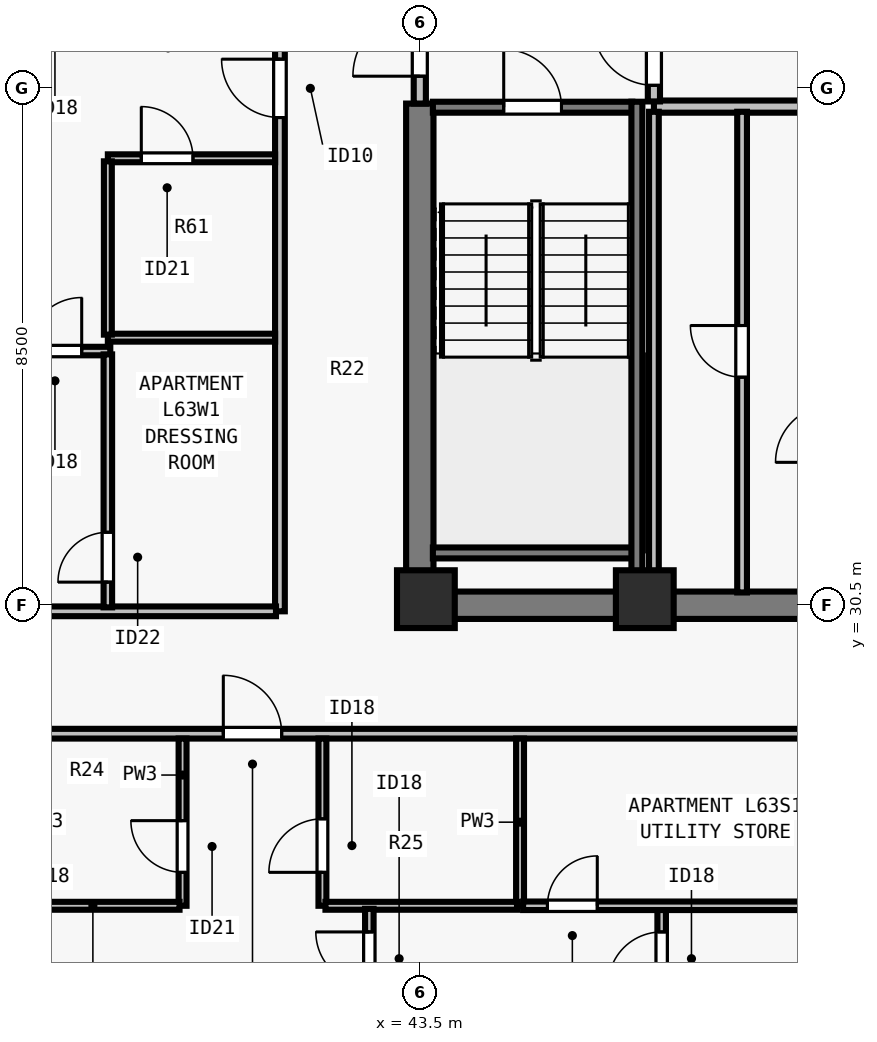
"""IFC4 building model, lengths in metres.
Left out: names, types, materials, properties, quantities, classifications, styles, units other than length and angle.
Written with IfcOpenShell. Run it as: python <this file> out.ifc"""

import sys

from ifc_helpers import new_model, si_unit, direction, frame, frame_2d, origin, origin_2d, place, context, subcontext, project, spatial, rectangle, extrude, element, fill, save


model = new_model("IFC4")
c1 = context("Model", 3, precision=1e-05, world=origin(), true_north=direction((0.0, 1.0)))
c2 = subcontext(c1, "Body", "Model", "MODEL_VIEW")
j1 = project(units=[si_unit("LENGTHUNIT", "METRE"), si_unit("PLANEANGLEUNIT", "RADIAN")], contexts=[c1])
p1 = place(None, origin())
s1 = spatial("IfcSite", under=j1, at=p1, CompositionType="ELEMENT")
p2 = place(p1, origin())
s2 = spatial("IfcBuilding", under=s1, at=p2, CompositionType="ELEMENT")
p3 = place(p2, frame((0.0, 0.0, 230.5)))
s3 = spatial("IfcBuildingStorey", under=s2, at=p3, CompositionType="ELEMENT", Elevation=230.5)
for number, where, z_axis, x_axis in (
    (1, (43.6, 30.6, 0.0), (0.0, 0.0, 1.0), (1.0, 0.0, 0.0)),
    (2, (47.2, 30.6, 0.0), (0.0, 0.0, 1.0), (1.0, 0.0, 0.0)),
):
    element("IfcColumn", number, at=place(p3, frame(where, z_axis=z_axis, x_axis=x_axis)), inside=s3, PredefinedType="COLUMN", context=c2, shape_type="SweptSolid", body=[
        extrude(rectangle(XDim=0.95, YDim=0.95, at=origin_2d()), origin(), (0.0, 0.0, 1.0), 3.5),
    ])
p4 = place(p3, frame((43.275, 30.5, 0.0), z_axis=(0.0, 0.0, 1.0), x_axis=(1.0, 0.0, 0.0)))
e3 = element("IfcWall", 3, at=p4, inside=s3, PredefinedType="SHEAR", context=c2, shape_type="SweptSolid", body=[
    extrude(rectangle(XDim=17.45, YDim=0.45, at=frame_2d((8.725, 0.0))), origin(), (0.0, 0.0, 1.0), 3.29),
])
p5 = place(p3, frame((43.5, 30.715, 0.0), z_axis=(0.0, 0.0, 1.0), x_axis=(0.0, 1.0, 0.0)))
e4 = element("IfcWall", 4, at=p5, inside=s3, PredefinedType="SHEAR", context=c2, shape_type="SweptSolid", body=[
    extrude(rectangle(XDim=8.035, YDim=0.45, at=frame_2d((4.018, 0.0))), origin(), (0.0, 0.0, 1.0), 3.29),
])
p6 = place(p3, frame((47.35, 38.7, 0.0), z_axis=(0.0, 0.0, 1.0), x_axis=(1.0, 0.0, 0.0)))
e5 = element("IfcWall", 5, at=p6, inside=s3, PredefinedType="SOLIDWALL", context=c2, shape_type="SweptSolid", body=[
    extrude(rectangle(XDim=2.95, YDim=0.2, at=frame_2d((1.475, 0.0))), origin(), (0.0, 0.0, 1.0), 3.29),
])
p7 = place(p3, frame((43.5, 38.75, 0.0), z_axis=(0.0, 0.0, 1.0), x_axis=(0.0, 1.0, 0.0)))
e6 = element("IfcWall", 6, at=p7, inside=s3, PredefinedType="SOLIDWALL", context=c2, shape_type="SweptSolid", body=[
    extrude(rectangle(XDim=2.05, YDim=0.2, at=frame_2d((1.025, 0.0))), origin(), (0.0, 0.0, 1.0), 3.29),
])
p8 = place(p7, frame((0.45, 0.0, 0.0)))
e7 = element("IfcOpeningElement", 7, at=p8, cuts=e6, PredefinedType="OPENING", context=c2, shape_type="SweptSolid", body=[
    extrude(rectangle(XDim=1.1, YDim=2.15, at=frame_2d((0.55, 1.075))), frame((0.0, 0.11, 0.0), z_axis=(0.0, -1.0, 0.0), x_axis=(1.0, 0.0, 0.0)), (0.0, 0.0, 1.0), 0.22),
])
p9 = place(p3, frame((47.35, 38.785, 0.0), z_axis=(0.0, 0.0, 1.0), x_axis=(0.0, 1.0, 0.0)))
e8 = element("IfcWall", 8, at=p9, inside=s3, PredefinedType="SOLIDWALL", context=c2, shape_type="SweptSolid", body=[
    extrude(rectangle(XDim=4.865, YDim=0.2, at=frame_2d((2.433, 0.0))), origin(), (0.0, 0.0, 1.0), 3.29),
])
p10 = place(p9, frame((0.265, 0.0, 0.0)))
e9 = element("IfcOpeningElement", 9, at=p10, cuts=e8, PredefinedType="OPENING", context=c2, shape_type="SweptSolid", body=[
    extrude(rectangle(XDim=1.0, YDim=2.15, at=frame_2d((0.5, 1.075))), frame((0.0, 0.11, 0.0), z_axis=(0.0, -1.0, 0.0), x_axis=(1.0, 0.0, 0.0)), (0.0, 0.0, 1.0), 0.22),
])
p11 = place(p3, frame((47.35, 30.71, 0.0), z_axis=(0.0, 0.0, 1.0), x_axis=(0.0, 1.0, 0.0)))
e10 = element("IfcWall", 10, at=p11, inside=s3, PredefinedType="PARTITIONING", context=c2, shape_type="SweptSolid", body=[
    extrude(rectangle(XDim=7.905, YDim=0.16, at=frame_2d((3.953, 0.0))), origin(), (0.0, 0.0, 1.0), 3.29),
])
p12 = place(p3, frame((48.8, 30.71, 0.0), z_axis=(0.0, 0.0, 1.0), x_axis=(0.0, 1.0, 0.0)))
e11 = element("IfcWall", 11, at=p12, inside=s3, PredefinedType="PARTITIONING", context=c2, shape_type="SweptSolid", body=[
    extrude(rectangle(XDim=7.905, YDim=0.16, at=frame_2d((3.953, 0.0))), origin(), (0.0, 0.0, 1.0), 3.29),
])
p13 = place(p12, frame((3.54, 0.0, 0.0)))
e12 = element("IfcOpeningElement", 12, at=p13, cuts=e11, PredefinedType="OPENING", context=c2, shape_type="SweptSolid", body=[
    extrude(rectangle(XDim=0.85, YDim=2.12, at=frame_2d((0.425, 1.06))), frame((0.0, 0.09, 0.0), z_axis=(0.0, -1.0, 0.0), x_axis=(1.0, 0.0, 0.0)), (0.0, 0.0, 1.0), 0.18),
])
p14 = place(p3, frame((29.805, 28.387, 0.0), z_axis=(0.0, 0.0, 1.0), x_axis=(1.0, 0.0, 0.0)))
e13 = element("IfcWall", 13, at=p14, inside=s3, PredefinedType="PARTITIONING", context=c2, shape_type="SweptSolid", body=[
    extrude(rectangle(XDim=44.39, YDim=0.16, at=frame_2d((22.195, 0.0))), origin(), (0.0, 0.0, 1.0), 2.958),
])
p15 = place(p14, frame((10.464, 0.0, 0.0)))
e14 = element("IfcOpeningElement", 14, at=p15, cuts=e13, PredefinedType="OPENING", context=c2, shape_type="SweptSolid", body=[
    extrude(rectangle(XDim=0.96, YDim=2.18, at=frame_2d((0.48, 1.09))), frame((0.0, 0.09, 0.0), z_axis=(0.0, -1.0, 0.0), x_axis=(1.0, 0.0, 0.0)), (0.0, 0.0, 1.0), 0.18),
])
p16 = place(p14, frame((32.544, 0.0, 0.0)))
e15 = element("IfcOpeningElement", 15, at=p16, cuts=e13, PredefinedType="OPENING", context=c2, shape_type="SweptSolid", body=[
    extrude(rectangle(XDim=0.96, YDim=2.18, at=frame_2d((0.48, 1.09))), frame((0.0, 0.09, 0.0), z_axis=(0.0, -1.0, 0.0), x_axis=(1.0, 0.0, 0.0)), (0.0, 0.0, 1.0), 0.18),
])
p17 = place(p3, frame((41.2, 30.4, 0.0), z_axis=(0.0, 0.0, 1.0), x_axis=(0.0, 1.0, 0.0)))
e16 = element("IfcWall", 16, at=p17, inside=s3, PredefinedType="PARTITIONING", context=c2, shape_type="SweptSolid", body=[
    extrude(rectangle(XDim=17.2, YDim=0.16, at=frame_2d((8.6, 0.0))), origin(), (0.0, 0.0, 1.0), 3.29),
])
p18 = place(p17, frame((8.12, 0.0, 0.0)))
e17 = element("IfcOpeningElement", 17, at=p18, cuts=e16, PredefinedType="OPENING", context=c2, shape_type="SweptSolid", body=[
    extrude(rectangle(XDim=0.96, YDim=2.18, at=frame_2d((0.48, 1.09))), frame((0.0, 0.09, 0.0), z_axis=(0.0, -1.0, 0.0), x_axis=(1.0, 0.0, 0.0)), (0.0, 0.0, 1.0), 0.18),
])
p19 = place(p3, frame((29.805, 30.4, 0.0), z_axis=(0.0, 0.0, 1.0), x_axis=(1.0, 0.0, 0.0)))
e18 = element("IfcWall", 18, at=p19, inside=s3, PredefinedType="PARTITIONING", context=c2, shape_type="SweptSolid", body=[
    extrude(rectangle(XDim=11.33, YDim=0.16, at=frame_2d((5.665, 0.0))), origin(), (0.0, 0.0, 1.0), 3.29),
])
p20 = place(p3, frame((39.599, 25.558, 0.0), z_axis=(0.0, 0.0, 1.0), x_axis=(0.0, 1.0, 0.0)))
e19 = element("IfcWall", 19, at=p20, inside=s3, PredefinedType="PLUMBINGWALL", context=c2, shape_type="SweptSolid", body=[
    extrude(rectangle(XDim=2.75, YDim=0.13, at=frame_2d((1.375, 0.0))), origin(), (0.0, 0.0, 1.0), 3.29),
])
p21 = place(p20, frame((0.55, 0.0, 0.0)))
e20 = element("IfcOpeningElement", 20, at=p21, cuts=e19, PredefinedType="OPENING", context=c2, shape_type="SweptSolid", body=[
    extrude(rectangle(XDim=0.85, YDim=2.08, at=frame_2d((0.425, 1.04))), frame((0.0, 0.075, 0.0), z_axis=(0.0, -1.0, 0.0), x_axis=(1.0, 0.0, 0.0)), (0.0, 0.0, 1.0), 0.15),
])
p22 = place(p3, frame((36.699, 25.558, 0.0), z_axis=(0.0, 0.0, 1.0), x_axis=(1.0, 0.0, 0.0)))
e21 = element("IfcWall", 21, at=p22, inside=s3, PredefinedType="PLUMBINGWALL", context=c2, shape_type="SweptSolid", body=[
    extrude(rectangle(XDim=2.85, YDim=0.13, at=frame_2d((1.425, 0.0))), origin(), (0.0, 0.0, 1.0), 3.29),
])
p23 = place(p3, frame((45.149, 25.558, 0.0), z_axis=(0.0, 0.0, 1.0), x_axis=(0.0, 1.0, 0.0)))
e22 = element("IfcWall", 22, at=p23, inside=s3, PredefinedType="PLUMBINGWALL", context=c2, shape_type="SweptSolid", body=[
    extrude(rectangle(XDim=2.75, YDim=0.13, at=frame_2d((1.375, 0.0))), origin(), (0.0, 0.0, 1.0), 3.29),
])
p24 = place(p3, frame((41.899, 25.558, 0.0), z_axis=(0.0, 0.0, 1.0), x_axis=(0.0, 1.0, 0.0)))
e23 = element("IfcWall", 23, at=p24, inside=s3, PredefinedType="PLUMBINGWALL", context=c2, shape_type="SweptSolid", body=[
    extrude(rectangle(XDim=2.75, YDim=0.13, at=frame_2d((1.375, 0.0))), origin(), (0.0, 0.0, 1.0), 2.573),
])
p25 = place(p24, frame((0.55, 0.0, 0.0)))
e24 = element("IfcOpeningElement", 24, at=p25, cuts=e23, PredefinedType="OPENING", context=c2, shape_type="SweptSolid", body=[
    extrude(rectangle(XDim=0.88, YDim=2.1, at=frame_2d((0.44, 1.05))), frame((0.0, 0.075, 0.0), z_axis=(0.0, -1.0, 0.0), x_axis=(1.0, 0.0, 0.0)), (0.0, 0.0, 1.0), 0.15),
])
p26 = place(p3, frame((41.949, 25.558, 0.0), z_axis=(0.0, 0.0, 1.0), x_axis=(1.0, 0.0, 0.0)))
e25 = element("IfcWall", 25, at=p26, inside=s3, PredefinedType="PLUMBINGWALL", context=c2, shape_type="SweptSolid", body=[
    extrude(rectangle(XDim=3.15, YDim=0.13, at=frame_2d((1.575, 0.0))), origin(), (0.0, 0.0, 1.0), 3.29),
])
p27 = place(p3, frame((47.478, 16.88, 0.0), z_axis=(0.0, 0.0, 1.0), x_axis=(0.0, 1.0, 0.0)))
e26 = element("IfcWall", 26, at=p27, inside=s3, PredefinedType="PARTITIONING", context=c2, shape_type="SweptSolid", body=[
    extrude(rectangle(XDim=8.718, YDim=0.14, at=frame_2d((4.359, 0.0))), origin(), (0.0, 0.0, 1.0), 2.958),
])
p28 = place(p27, frame((7.367, 0.0, 0.0)))
e27 = element("IfcOpeningElement", 27, at=p28, cuts=e26, PredefinedType="OPENING", context=c2, shape_type="SweptSolid", body=[
    extrude(rectangle(XDim=0.88, YDim=2.1, at=frame_2d((0.44, 1.05))), frame((0.0, 0.08, 0.0), z_axis=(0.0, -1.0, 0.0), x_axis=(1.0, 0.0, 0.0)), (0.0, 0.0, 1.0), 0.16),
])
p29 = place(p3, frame((45.199, 25.558, 0.0), z_axis=(0.0, 0.0, 1.0), x_axis=(1.0, 0.0, 0.0)))
e28 = element("IfcWall", 28, at=p29, inside=s3, PredefinedType="PARTITIONING", context=c2, shape_type="SweptSolid", body=[
    extrude(rectangle(XDim=6.429, YDim=0.14, at=frame_2d((3.214, 0.0))), origin(), (0.0, 0.0, 1.0), 3.29),
])
p30 = place(p29, frame((0.4, 0.0, 0.0)))
e29 = element("IfcOpeningElement", 29, at=p30, cuts=e28, PredefinedType="OPENING", context=c2, shape_type="SweptSolid", body=[
    extrude(rectangle(XDim=0.82, YDim=2.1, at=frame_2d((0.41, 1.05))), frame((0.0, 0.08, 0.0), z_axis=(0.0, -1.0, 0.0), x_axis=(1.0, 0.0, 0.0)), (0.0, 0.0, 1.0), 0.16),
])
p31 = place(p3, frame((42.67, 16.88, 0.0), z_axis=(0.0, 0.0, 1.0), x_axis=(0.0, 1.0, 0.0)))
e30 = element("IfcWall", 30, at=p31, inside=s3, PredefinedType="PARTITIONING", context=c2, shape_type="SweptSolid", body=[
    extrude(rectangle(XDim=8.628, YDim=0.14, at=frame_2d((4.314, 0.0))), origin(), (0.0, 0.0, 1.0), 3.29),
])
p32 = place(p31, frame((7.367, 0.0, 0.0)))
e31 = element("IfcOpeningElement", 31, at=p32, cuts=e30, PredefinedType="OPENING", context=c2, shape_type="SweptSolid", body=[
    extrude(rectangle(XDim=0.88, YDim=2.1, at=frame_2d((0.44, 1.05))), frame((0.0, 0.08, 0.0), z_axis=(0.0, -1.0, 0.0), x_axis=(1.0, 0.0, 0.0)), (0.0, 0.0, 1.0), 0.16),
])
p33 = place(p3, frame((38.37, 34.9, 0.0), z_axis=(0.0, 0.0, 1.0), x_axis=(1.0, 0.0, 0.0)))
e32 = element("IfcWall", 32, at=p33, inside=s3, PredefinedType="PLUMBINGWALL", context=c2, shape_type="SweptSolid", body=[
    extrude(rectangle(XDim=2.75, YDim=0.13, at=frame_2d((1.375, 0.0))), origin(), (0.0, 0.0, 1.0), 3.29),
])
p34 = place(p3, frame((38.37, 37.85, 0.0), z_axis=(0.0, 0.0, 1.0), x_axis=(1.0, 0.0, 0.0)))
e33 = element("IfcWall", 33, at=p34, inside=s3, PredefinedType="PLUMBINGWALL", context=c2, shape_type="SweptSolid", body=[
    extrude(rectangle(XDim=2.75, YDim=0.13, at=frame_2d((1.375, 0.0))), origin(), (0.0, 0.0, 1.0), 3.29),
])
p35 = place(p34, frame((0.55, 0.0, 0.0)))
e34 = element("IfcOpeningElement", 34, at=p35, cuts=e33, PredefinedType="OPENING", context=c2, shape_type="SweptSolid", body=[
    extrude(rectangle(XDim=0.85, YDim=2.08, at=frame_2d((0.425, 1.04))), frame((0.0, 0.075, 0.0), z_axis=(0.0, -1.0, 0.0), x_axis=(1.0, 0.0, 0.0)), (0.0, 0.0, 1.0), 0.15),
])
p36 = place(p3, frame((38.37, 34.95, 0.0), z_axis=(0.0, 0.0, 1.0), x_axis=(0.0, 1.0, 0.0)))
e35 = element("IfcWall", 35, at=p36, inside=s3, PredefinedType="PLUMBINGWALL", context=c2, shape_type="SweptSolid", body=[
    extrude(rectangle(XDim=2.85, YDim=0.13, at=frame_2d((1.425, 0.0))), origin(), (0.0, 0.0, 1.0), 3.29),
])
p37 = place(p3, frame((29.88, 34.68, 0.0), z_axis=(0.0, 0.0, 1.0), x_axis=(1.0, 0.0, 0.0)))
e36 = element("IfcWall", 36, at=p37, inside=s3, PredefinedType="PARTITIONING", context=c2, shape_type="SweptSolid", body=[
    extrude(rectangle(XDim=8.53, YDim=0.14, at=frame_2d((4.265, 0.0))), origin(), (0.0, 0.0, 1.0), 2.958),
])
p38 = place(p37, frame((7.18, 0.0, 0.0)))
e37 = element("IfcOpeningElement", 37, at=p38, cuts=e36, PredefinedType="OPENING", context=c2, shape_type="SweptSolid", body=[
    extrude(rectangle(XDim=0.88, YDim=2.1, at=frame_2d((0.44, 1.05))), frame((0.0, 0.08, 0.0), z_axis=(0.0, -1.0, 0.0), x_axis=(1.0, 0.0, 0.0)), (0.0, 0.0, 1.0), 0.16),
])
p39 = place(p3, frame((38.37, 30.465, 0.0), z_axis=(0.0, 0.0, 1.0), x_axis=(0.0, 1.0, 0.0)))
e38 = element("IfcWall", 38, at=p39, inside=s3, PredefinedType="PARTITIONING", context=c2, shape_type="SweptSolid", body=[
    extrude(rectangle(XDim=4.16, YDim=0.14, at=frame_2d((2.08, 0.0))), origin(), (0.0, 0.0, 1.0), 3.29),
])
p40 = place(p39, frame((0.415, 0.0, 0.0)))
e39 = element("IfcOpeningElement", 39, at=p40, cuts=e38, PredefinedType="OPENING", context=c2, shape_type="SweptSolid", body=[
    extrude(rectangle(XDim=0.82, YDim=2.1, at=frame_2d((0.41, 1.05))), frame((0.0, 0.08, 0.0), z_axis=(0.0, -1.0, 0.0), x_axis=(1.0, 0.0, 0.0)), (0.0, 0.0, 1.0), 0.16),
])
p41 = place(p3, frame((43.715, 38.69, 0.0), z_axis=(0.0, 0.0, 1.0), x_axis=(1.0, 0.0, 0.0)))
e40 = element("IfcWall", 40, at=p41, inside=s3, PredefinedType="SOLIDWALL", context=c2, shape_type="SweptSolid", body=[
    extrude(rectangle(XDim=3.28, YDim=0.18, at=frame_2d((1.64, 0.0))), origin(), (0.0, 0.0, 1.0), 3.29),
])
p42 = place(p41, frame((1.165, 0.0, 0.0)))
e41 = element("IfcOpeningElement", 41, at=p42, cuts=e40, PredefinedType="OPENING", context=c2, shape_type="SweptSolid", body=[
    extrude(rectangle(XDim=0.95, YDim=2.15, at=frame_2d((0.475, 1.075))), frame((0.0, 0.1, 0.0), z_axis=(0.0, -1.0, 0.0), x_axis=(1.0, 0.0, 0.0)), (0.0, 0.0, 1.0), 0.2),
])
p43 = place(p3, frame((43.715, 31.36, 0.0), z_axis=(0.0, 0.0, 1.0), x_axis=(1.0, 0.0, 0.0)))
e42 = element("IfcWall", 42, at=p43, inside=s3, PredefinedType="SOLIDWALL", context=c2, shape_type="SweptSolid", body=[
    extrude(rectangle(XDim=3.28, YDim=0.18, at=frame_2d((1.64, 0.0))), origin(), (0.0, 0.0, 1.0), 3.29),
])
p44 = place(p3, frame((47.07, 38.78, 0.0), z_axis=(0.0, 0.0, 1.0), x_axis=(0.0, -1.0, 0.0)))
e43 = element("IfcWall", 43, at=p44, inside=s3, PredefinedType="SOLIDWALL", context=c2, shape_type="SweptSolid", body=[
    extrude(rectangle(XDim=8.067, YDim=0.18, at=frame_2d((4.034, 0.0))), origin(), (0.0, 0.0, 1.0), 3.29),
])
p45 = place(p8, origin())
e44 = element("IfcDoor", 44, at=p45, inside=s3, OperationType="SINGLE_SWING_LEFT", PredefinedType="DOOR", context=c2, shape_type="SweptSolid", body=[
    extrude(rectangle(XDim=1.1, YDim=2.15, at=frame_2d((0.55, 1.075))), frame((0.0, 0.025, 0.0), z_axis=(0.0, -1.0, 0.0), x_axis=(1.0, 0.0, 0.0)), (0.0, 0.0, 1.0), 0.05),
])
fill(e7, e44)
p46 = place(p10, origin())
e45 = element("IfcDoor", 45, at=p46, inside=s3, OperationType="SINGLE_SWING_RIGHT", PredefinedType="DOOR", context=c2, shape_type="SweptSolid", body=[
    extrude(rectangle(XDim=1.0, YDim=2.15, at=frame_2d((0.5, 1.075))), frame((0.0, 0.025, 0.0), z_axis=(0.0, -1.0, 0.0), x_axis=(1.0, 0.0, 0.0)), (0.0, 0.0, 1.0), 0.05),
])
fill(e9, e45)
p47 = place(p13, origin())
e46 = element("IfcDoor", 46, at=p47, inside=s3, OperationType="SINGLE_SWING_RIGHT", PredefinedType="DOOR", context=c2, shape_type="SweptSolid", body=[
    extrude(rectangle(XDim=0.85, YDim=2.12, at=frame_2d((0.425, 1.06))), frame((0.0, 0.025, 0.0), z_axis=(0.0, -1.0, 0.0), x_axis=(1.0, 0.0, 0.0)), (0.0, 0.0, 1.0), 0.05),
])
fill(e12, e46)
p48 = place(p21, origin())
e47 = element("IfcDoor", 47, at=p48, inside=s3, OperationType="SINGLE_SWING_RIGHT", PredefinedType="DOOR", context=c2, shape_type="SweptSolid", body=[
    extrude(rectangle(XDim=0.85, YDim=2.08, at=frame_2d((0.425, 1.04))), frame((0.0, 0.025, 0.0), z_axis=(0.0, -1.0, 0.0), x_axis=(1.0, 0.0, 0.0)), (0.0, 0.0, 1.0), 0.05),
])
fill(e20, e47)
p49 = place(p25, origin())
e48 = element("IfcDoor", 48, at=p49, inside=s3, OperationType="SINGLE_SWING_LEFT", PredefinedType="DOOR", context=c2, shape_type="SweptSolid", body=[
    extrude(rectangle(XDim=0.88, YDim=2.1, at=frame_2d((0.44, 1.05))), frame((0.0, 0.025, 0.0), z_axis=(0.0, -1.0, 0.0), x_axis=(1.0, 0.0, 0.0)), (0.0, 0.0, 1.0), 0.05),
])
fill(e24, e48)
p50 = place(p30, origin())
e49 = element("IfcDoor", 49, at=p50, inside=s3, OperationType="SINGLE_SWING_RIGHT", PredefinedType="DOOR", context=c2, shape_type="SweptSolid", body=[
    extrude(rectangle(XDim=0.82, YDim=2.1, at=frame_2d((0.41, 1.05))), frame((0.0, 0.025, 0.0), z_axis=(0.0, -1.0, 0.0), x_axis=(1.0, 0.0, 0.0)), (0.0, 0.0, 1.0), 0.05),
])
fill(e29, e49)
p51 = place(p28, origin())
e50 = element("IfcDoor", 50, at=p51, inside=s3, OperationType="SINGLE_SWING_LEFT", PredefinedType="DOOR", context=c2, shape_type="SweptSolid", body=[
    extrude(rectangle(XDim=0.88, YDim=2.1, at=frame_2d((0.44, 1.05))), frame((0.0, 0.025, 0.0), z_axis=(0.0, -1.0, 0.0), x_axis=(1.0, 0.0, 0.0)), (0.0, 0.0, 1.0), 0.05),
])
fill(e27, e50)
p52 = place(p32, origin())
e51 = element("IfcDoor", 51, at=p52, inside=s3, OperationType="SINGLE_SWING_RIGHT", PredefinedType="DOOR", context=c2, shape_type="SweptSolid", body=[
    extrude(rectangle(XDim=0.88, YDim=2.1, at=frame_2d((0.44, 1.05))), frame((0.0, 0.025, 0.0), z_axis=(0.0, -1.0, 0.0), x_axis=(1.0, 0.0, 0.0)), (0.0, 0.0, 1.0), 0.05),
])
fill(e31, e51)
p53 = place(p15, origin())
e52 = element("IfcDoor", 52, at=p53, inside=s3, OperationType="SINGLE_SWING_LEFT", PredefinedType="DOOR", context=c2, shape_type="SweptSolid", body=[
    extrude(rectangle(XDim=0.96, YDim=2.18, at=frame_2d((0.48, 1.09))), frame((0.0, 0.025, 0.0), z_axis=(0.0, -1.0, 0.0), x_axis=(1.0, 0.0, 0.0)), (0.0, 0.0, 1.0), 0.05),
])
fill(e14, e52)
p54 = place(p35, origin())
e53 = element("IfcDoor", 53, at=p54, inside=s3, OperationType="SINGLE_SWING_LEFT", PredefinedType="DOOR", context=c2, shape_type="SweptSolid", body=[
    extrude(rectangle(XDim=0.85, YDim=2.08, at=frame_2d((0.425, 1.04))), frame((0.0, 0.025, 0.0), z_axis=(0.0, -1.0, 0.0), x_axis=(1.0, 0.0, 0.0)), (0.0, 0.0, 1.0), 0.05),
])
fill(e34, e53)
p55 = place(p40, origin())
e54 = element("IfcDoor", 54, at=p55, inside=s3, OperationType="SINGLE_SWING_LEFT", PredefinedType="DOOR", context=c2, shape_type="SweptSolid", body=[
    extrude(rectangle(XDim=0.82, YDim=2.1, at=frame_2d((0.41, 1.05))), frame((0.0, 0.025, 0.0), z_axis=(0.0, -1.0, 0.0), x_axis=(1.0, 0.0, 0.0)), (0.0, 0.0, 1.0), 0.05),
])
fill(e39, e54)
p56 = place(p38, origin())
e55 = element("IfcDoor", 55, at=p56, inside=s3, OperationType="SINGLE_SWING_RIGHT", PredefinedType="DOOR", context=c2, shape_type="SweptSolid", body=[
    extrude(rectangle(XDim=0.88, YDim=2.1, at=frame_2d((0.44, 1.05))), frame((0.0, 0.025, 0.0), z_axis=(0.0, -1.0, 0.0), x_axis=(1.0, 0.0, 0.0)), (0.0, 0.0, 1.0), 0.05),
])
fill(e37, e55)
p57 = place(p18, origin())
e56 = element("IfcDoor", 56, at=p57, inside=s3, OperationType="SINGLE_SWING_RIGHT", PredefinedType="DOOR", context=c2, shape_type="SweptSolid", body=[
    extrude(rectangle(XDim=0.96, YDim=2.18, at=frame_2d((0.48, 1.09))), frame((0.0, 0.025, 0.0), z_axis=(0.0, -1.0, 0.0), x_axis=(1.0, 0.0, 0.0)), (0.0, 0.0, 1.0), 0.05),
])
fill(e17, e56)
p58 = place(p42, origin())
e57 = element("IfcDoor", 57, at=p58, inside=s3, OperationType="SINGLE_SWING_LEFT", PredefinedType="DOOR", context=c2, shape_type="SweptSolid", body=[
    extrude(rectangle(XDim=0.95, YDim=2.15, at=frame_2d((0.475, 1.075))), frame((0.0, 0.025, 0.0), z_axis=(0.0, -1.0, 0.0), x_axis=(1.0, 0.0, 0.0)), (0.0, 0.0, 1.0), 0.05),
])
fill(e41, e57)
save(model, sys.argv[1])
